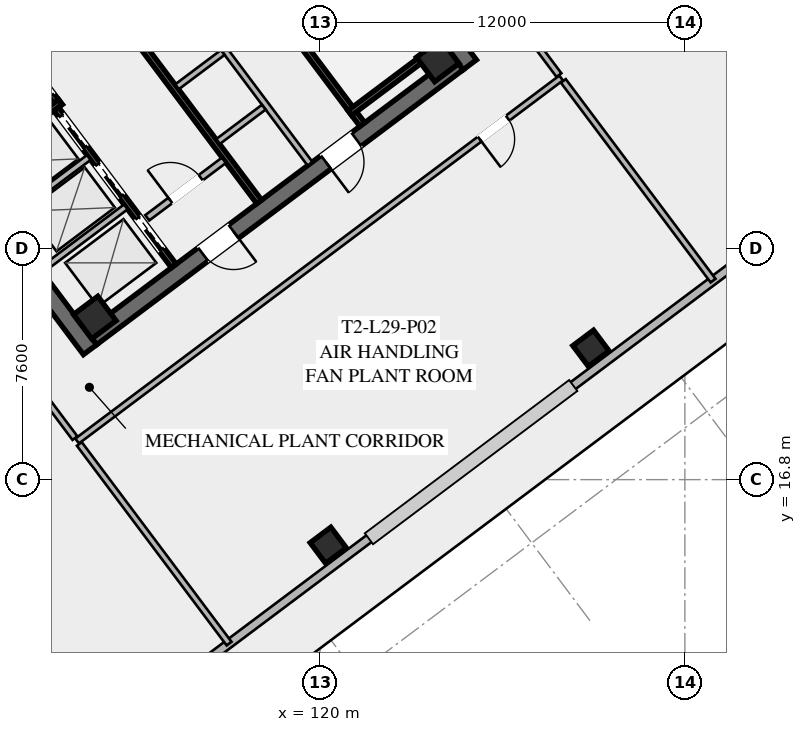
"""IFC4 building model, lengths in metres.
Left out: names, types, materials, properties, quantities, classifications, styles, units other than length and angle.
Written with IfcOpenShell. Run it as: python <this file> out.ifc"""

import sys

from ifc_helpers import new_model, si_unit, direction, frame, frame_2d, origin, origin_2d, place, context, subcontext, project, spatial, rectangle, hollow_rectangle, extrude, element, fill, save


model = new_model("IFC4")
c1 = context("Model", 3, precision=1e-05, world=origin(), true_north=direction((0.0, 1.0)))
c2 = subcontext(c1, "Body", "Model", "MODEL_VIEW")
j1 = project(units=[si_unit("LENGTHUNIT", "METRE"), si_unit("PLANEANGLEUNIT", "RADIAN")], contexts=[c1])
p1 = place(None, origin())
s1 = spatial("IfcSite", under=j1, at=p1, CompositionType="ELEMENT")
p2 = place(p1, origin())
s2 = spatial("IfcBuilding", under=s1, at=p2, CompositionType="ELEMENT")
p3 = place(p2, frame((0.0, 0.0, 109.8)))
s3 = spatial("IfcBuildingStorey", under=s2, at=p3, CompositionType="ELEMENT", Elevation=109.8)
for number, where, z_axis, x_axis in (
    (1, (112.436, 21.077, 0.0), (0.0, 0.0, 1.0), (-0.6, 0.8, 0.0)),
    (2, (115.564, 42.923, 0.0), (0.0, 0.0, 1.0), (0.6, -0.8, 0.0)),
):
    element("IfcWall", number, at=place(p3, frame(where, z_axis=z_axis, x_axis=x_axis)), inside=s3, PredefinedType="SHEAR", context=c2, shape_type="SweptSolid", body=[
        extrude(rectangle(XDim=15.6, YDim=0.55, at=frame_2d((7.8, 0.0))), origin(), (0.0, 0.0, 1.0), 4.6),
    ])
p4 = place(p3, frame((124.539, 30.498, 0.0), z_axis=(0.0, 0.0, 1.0), x_axis=(-0.799998054672, -0.600002593761, 0.0)))
e3 = element("IfcWall", 3, at=p4, inside=s3, PredefinedType="SHEAR", context=c2, shape_type="SweptSolid", body=[
    extrude(rectangle(XDim=15.06, YDim=0.55, at=frame_2d((7.53, 0.0))), origin(), (0.0, 0.0, 1.0), 4.6),
])
p5 = place(p4, frame((9.23, 0.0, 0.0)))
e4 = element("IfcOpeningElement", 4, at=p5, cuts=e3, PredefinedType="OPENING", context=c2, shape_type="SweptSolid", body=[
    extrude(rectangle(XDim=1.25, YDim=2.25, at=frame_2d((0.625, 1.125))), frame((0.0, 0.285, 0.0), z_axis=(0.0, -1.0, 0.0), x_axis=(1.0, 0.0, 0.0)), (0.0, 0.0, 1.0), 0.57),
])
p6 = place(p4, frame((4.18, 0.0, 0.0)))
e5 = element("IfcOpeningElement", 5, at=p6, cuts=e3, PredefinedType="OPENING", context=c2, shape_type="SweptSolid", body=[
    extrude(rectangle(XDim=1.25, YDim=2.25, at=frame_2d((0.625, 1.125))), frame((0.0, 0.285, 0.0), z_axis=(0.0, -1.0, 0.0), x_axis=(1.0, 0.0, 0.0)), (0.0, 0.0, 1.0), 0.57),
])
for number, where, z_axis, x_axis in (
    (6, (112.59, 22.13, 0.0), (0.0, 0.0, 1.0), (0.8, 0.6, 0.0)),
    (7, (123.87, 30.59, 0.0), (0.0, 0.0, 1.0), (0.8, 0.6, 0.0)),
):
    element("IfcColumn", number, at=place(p3, frame(where, z_axis=z_axis, x_axis=x_axis)), inside=s3, PredefinedType="COLUMN", context=c2, shape_type="SweptSolid", body=[
        extrude(hollow_rectangle(XDim=1.0, YDim=1.0, WallThickness=0.04, at=origin_2d()), origin(), (0.0, 0.0, 1.0), 4.42),
    ])
for number, where, z_axis, x_axis in (
    (8, (120.27, 14.64, -0.295), (0.0, 0.0, 1.0), (0.8, 0.6, 0.0)),
    (9, (128.91, 21.12, -0.295), (0.0, 0.0, 1.0), (0.8, 0.6, 0.0)),
):
    element("IfcColumn", number, at=place(p3, frame(where, z_axis=z_axis, x_axis=x_axis)), inside=s3, PredefinedType="COLUMN", context=c2, shape_type="SweptSolid", body=[
        extrude(hollow_rectangle(XDim=0.85, YDim=0.85, WallThickness=0.035, at=origin_2d()), origin(), (0.0, 0.0, 1.0), 4.715),
    ])
for number, where, z_axis, x_axis in (
    (10, (137.672, 26.904, 0.0), (0.0, 0.0, 1.0), (-0.8, -0.6, 0.0)),
    (11, (119.096, 55.672, 0.0), (0.0, 0.0, 1.0), (0.6, -0.8, 0.0)),
):
    element("IfcWall", number, at=place(p3, frame(where, z_axis=z_axis, x_axis=x_axis)), inside=s3, PredefinedType="SOLIDWALL", context=c2, shape_type="SweptSolid", body=[
        extrude(rectangle(XDim=31.76, YDim=0.28, at=frame_2d((15.88, 0.0))), origin(), (0.0, 0.0, 1.0), 4.42),
    ])
p7 = place(p3, frame((111.44, 29.08, 0.0), z_axis=(0.0, 0.0, 1.0), x_axis=(-0.59999029481, 0.8000072788, 0.0)))
e12 = element("IfcWall", 12, at=p7, inside=s3, PredefinedType="SHEAR", context=c2, shape_type="SweptSolid", body=[
    extrude(rectangle(XDim=8.05, YDim=0.2, at=frame_2d((4.025, 0.0))), origin(), (0.0, 0.0, 1.0), 4.42),
])
p8 = place(p7, frame((0.45, 0.0, 0.0)))
e13 = element("IfcOpeningElement", 13, at=p8, cuts=e12, PredefinedType="OPENING", context=c2, shape_type="SweptSolid", body=[
    extrude(rectangle(XDim=1.15, YDim=2.2, at=frame_2d((0.575, 1.1))), frame((0.0, 0.11, 0.0), z_axis=(0.0, -1.0, 0.0), x_axis=(1.0, 0.0, 0.0)), (0.0, 0.0, 1.0), 0.22),
])
p9 = place(p3, frame((108.396, 26.922, 0.0), z_axis=(0.0, 0.0, 1.0), x_axis=(0.800015298837, 0.599979601008, 0.0)))
e14 = element("IfcWall", 14, at=p9, inside=s3, PredefinedType="SHEAR", context=c2, shape_type="SweptSolid", body=[
    extrude(rectangle(XDim=3.83, YDim=0.2, at=frame_2d((1.915, 0.0))), origin(), (0.0, 0.0, 1.0), 4.42),
])
p10 = place(p3, frame((116.56, 34.92, 0.0), z_axis=(0.0, 0.0, 1.0), x_axis=(0.59999029481, -0.8000072788, 0.0)))
e15 = element("IfcWall", 15, at=p10, inside=s3, PredefinedType="SHEAR", context=c2, shape_type="SweptSolid", body=[
    extrude(rectangle(XDim=8.05, YDim=0.2, at=frame_2d((4.025, 0.0))), origin(), (0.0, 0.0, 1.0), 4.42),
])
p11 = place(p10, frame((0.45, 0.0, 0.0)))
e16 = element("IfcOpeningElement", 16, at=p11, cuts=e15, PredefinedType="OPENING", context=c2, shape_type="SweptSolid", body=[
    extrude(rectangle(XDim=1.15, YDim=2.2, at=frame_2d((0.575, 1.1))), frame((0.0, 0.11, 0.0), z_axis=(0.0, -1.0, 0.0), x_axis=(1.0, 0.0, 0.0)), (0.0, 0.0, 1.0), 0.22),
])
p12 = place(p3, frame((120.98, 28.86, 0.0), z_axis=(0.0, 0.0, 1.0), x_axis=(0.800015298837, 0.599979601008, 0.0)))
e17 = element("IfcWall", 17, at=p12, inside=s3, PredefinedType="SHEAR", context=c2, shape_type="SweptSolid", body=[
    extrude(rectangle(XDim=3.83, YDim=0.2, at=frame_2d((1.915, 0.0))), origin(), (0.0, 0.0, 1.0), 4.42),
])
p13 = place(p3, frame((117.998, 25.936, 0.0), z_axis=(0.0, 0.0, 1.0), x_axis=(-0.600002693989, 0.799997979501, 0.0)))
e18 = element("IfcWall", 18, at=p13, inside=s3, PredefinedType="SHEAR", context=c2, shape_type="SweptSolid", body=[
    extrude(rectangle(XDim=14.5, YDim=0.2, at=frame_2d((7.25, 0.0))), origin(), (0.0, 0.0, 1.0), 4.42),
])
p14 = place(p3, frame((114.316, 25.412, 0.0), z_axis=(0.0, 0.0, 1.0), x_axis=(0.800018601094, 0.59997519774, 0.0)))
e19 = element("IfcWall", 19, at=p14, inside=s3, PredefinedType="SOLIDWALL", context=c2, shape_type="SweptSolid", body=[
    extrude(rectangle(XDim=3.15, YDim=0.22, at=frame_2d((1.575, 0.0))), origin(), (0.0, 0.0, 1.0), 3.531),
])
p15 = place(p14, frame((0.95, 0.0, 0.0)))
e20 = element("IfcOpeningElement", 20, at=p15, cuts=e19, PredefinedType="OPENING", context=c2, shape_type="SweptSolid", body=[
    extrude(rectangle(XDim=1.25, YDim=2.25, at=frame_2d((0.625, 1.125))), frame((0.0, 0.12, 0.0), z_axis=(0.0, -1.0, 0.0), x_axis=(1.0, 0.0, 0.0)), (0.0, 0.0, 1.0), 0.24),
])
p16 = place(p3, frame((115.19, 23.83, 0.0), z_axis=(0.0, 0.0, 1.0), x_axis=(-0.599993943644, 0.800004542231, 0.0)))
e21 = element("IfcWall", 21, at=p16, inside=s3, PredefinedType="SHEAR", context=c2, shape_type="SweptSolid", body=[
    extrude(rectangle(XDim=6.45, YDim=0.2, at=frame_2d((3.225, 0.0))), origin(), (0.0, 0.0, 1.0), 4.42),
])
p17 = place(p16, frame((4.875, 0.0, 0.0)))
e22 = element("IfcOpeningElement", 22, at=p17, cuts=e21, PredefinedType="OPENING", context=c2, shape_type="SweptSolid", body=[
    extrude(rectangle(XDim=1.3, YDim=2.25, at=frame_2d((0.65, 1.125))), frame((0.0, 0.11, 0.0), z_axis=(0.0, -1.0, 0.0), x_axis=(1.0, 0.0, 0.0)), (0.0, 0.0, 1.0), 0.22),
])
p18 = place(p16, frame((2.875, 0.0, 0.0)))
e23 = element("IfcOpeningElement", 23, at=p18, cuts=e21, PredefinedType="OPENING", context=c2, shape_type="SweptSolid", body=[
    extrude(rectangle(XDim=1.3, YDim=2.25, at=frame_2d((0.65, 1.125))), frame((0.0, 0.11, 0.0), z_axis=(0.0, -1.0, 0.0), x_axis=(1.0, 0.0, 0.0)), (0.0, 0.0, 1.0), 0.22),
])
p19 = place(p16, frame((0.675, 0.0, 0.0)))
e24 = element("IfcOpeningElement", 24, at=p19, cuts=e21, PredefinedType="OPENING", context=c2, shape_type="SweptSolid", body=[
    extrude(rectangle(XDim=1.3, YDim=2.25, at=frame_2d((0.65, 1.125))), frame((0.0, 0.11, 0.0), z_axis=(0.0, -1.0, 0.0), x_axis=(1.0, 0.0, 0.0)), (0.0, 0.0, 1.0), 0.22),
])
for number, where, z_axis, x_axis in (
    (25, (110.826, 23.682, 0.0), (0.0, 0.0, 1.0), (0.8, 0.6, 0.0)),
    (26, (109.608, 25.306, 0.0), (0.0, 0.0, 1.0), (0.8, 0.6, 0.0)),
):
    element("IfcWall", number, at=place(p3, frame(where, z_axis=z_axis, x_axis=x_axis)), inside=s3, PredefinedType="SOLIDWALL", context=c2, shape_type="SweptSolid", body=[
        extrude(rectangle(XDim=3.48, YDim=0.2, at=frame_2d((1.74, 0.0))), origin(), (0.0, 0.0, 1.0), 4.42),
    ])
p20 = place(p3, frame((119.67, 27.19, 0.0), z_axis=(0.0, 0.0, 1.0), x_axis=(-0.599988677396, 0.800008491828, 0.0)))
e27 = element("IfcWall", 27, at=p20, inside=s3, PredefinedType="SOLIDWALL", context=c2, shape_type="SweptSolid", body=[
    extrude(rectangle(XDim=6.9, YDim=0.2, at=frame_2d((3.45, 0.0))), origin(), (0.0, 0.0, 1.0), 4.42),
])
p21 = place(p3, frame((116.646, 27.922, 0.0), z_axis=(0.0, 0.0, 1.0), x_axis=(0.8, 0.6, 0.0)))
e28 = element("IfcWall", 28, at=p21, inside=s3, PredefinedType="SOLIDWALL", context=c2, shape_type="SweptSolid", body=[
    extrude(rectangle(XDim=1.88, YDim=0.2, at=frame_2d((0.94, 0.0))), origin(), (0.0, 0.0, 1.0), 4.42),
])
p22 = place(p3, frame((115.296, 29.722, 0.0), z_axis=(0.0, 0.0, 1.0), x_axis=(0.799984418148, 0.600020775241, 0.0)))
e29 = element("IfcWall", 29, at=p22, inside=s3, PredefinedType="SOLIDWALL", context=c2, shape_type="SweptSolid", body=[
    extrude(rectangle(XDim=1.88, YDim=0.2, at=frame_2d((0.94, 0.0))), origin(), (0.0, 0.0, 1.0), 4.42),
])
p23 = place(p3, frame((127.93, 30.01, 0.0), z_axis=(0.0, 0.0, 1.0), x_axis=(-0.8, -0.6, 0.0)))
e30 = element("IfcWall", 30, at=p23, inside=s3, PredefinedType="SOLIDWALL", context=c2, shape_type="SweptSolid", body=[
    extrude(rectangle(XDim=19.9, YDim=0.2, at=frame_2d((9.95, 0.0))), origin(), (0.0, 0.0, 1.0), 3.531),
])
p24 = place(p23, frame((2.2, 0.0, 0.0)))
e31 = element("IfcOpeningElement", 31, at=p24, cuts=e30, PredefinedType="OPENING", context=c2, shape_type="SweptSolid", body=[
    extrude(rectangle(XDim=1.15, YDim=2.2, at=frame_2d((0.575, 1.1))), frame((0.0, 0.11, 0.0), z_axis=(0.0, -1.0, 0.0), x_axis=(1.0, 0.0, 0.0)), (0.0, 0.0, 1.0), 0.22),
])
p25 = place(p3, frame((124.0, 35.25, 0.0), z_axis=(0.0, 0.0, 1.0), x_axis=(0.599987849816, -0.800009112494, 0.0)))
e32 = element("IfcWall", 32, at=p25, inside=s3, PredefinedType="SOLIDWALL", context=c2, shape_type="SweptSolid", body=[
    extrude(rectangle(XDim=6.43, YDim=0.2, at=frame_2d((3.215, 0.0))), origin(), (0.0, 0.0, 1.0), 3.531),
])
p26 = place(p25, frame((3.0, 0.0, 0.0)))
e33 = element("IfcOpeningElement", 33, at=p26, cuts=e32, PredefinedType="OPENING", context=c2, shape_type="SweptSolid", body=[
    extrude(rectangle(XDim=1.15, YDim=2.2, at=frame_2d((0.575, 1.1))), frame((0.0, 0.11, 0.0), z_axis=(0.0, -1.0, 0.0), x_axis=(1.0, 0.0, 0.0)), (0.0, 0.0, 1.0), 0.22),
])
p27 = place(p3, frame((111.938, 18.166, 0.0), z_axis=(0.0, 0.0, 1.0), x_axis=(-0.59999602618, 0.80000298035, 0.0)))
e34 = element("IfcWall", 34, at=p27, inside=s3, PredefinedType="SOLIDWALL", context=c2, shape_type="SweptSolid", body=[
    extrude(rectangle(XDim=19.66, YDim=0.2, at=frame_2d((9.83, 0.0))), origin(), (0.0, 0.0, 1.0), 3.531),
])
p28 = place(p27, frame((3.0, 0.0, 0.0)))
e35 = element("IfcOpeningElement", 35, at=p28, cuts=e34, PredefinedType="OPENING", context=c2, shape_type="SweptSolid", body=[
    extrude(rectangle(XDim=1.25, YDim=2.25, at=frame_2d((0.625, 1.125))), frame((0.0, 0.11, 0.0), z_axis=(0.0, -1.0, 0.0), x_axis=(1.0, 0.0, 0.0)), (0.0, 0.0, 1.0), 0.22),
])
p29 = place(p27, frame((13.2, 0.0, 0.0)))
e36 = element("IfcOpeningElement", 36, at=p29, cuts=e34, PredefinedType="OPENING", context=c2, shape_type="SweptSolid", body=[
    extrude(rectangle(XDim=1.15, YDim=2.2, at=frame_2d((0.575, 1.1))), frame((0.0, 0.11, 0.0), z_axis=(0.0, -1.0, 0.0), x_axis=(1.0, 0.0, 0.0)), (0.0, 0.0, 1.0), 0.22),
])
for number, where, z_axis, x_axis in (
    (37, (112.082, 17.974, 0.0), (0.0, 0.0, 1.0), (0.6, -0.8, 0.0)),
    (38, (128.002, 29.914, 0.0), (0.0, 0.0, 1.0), (0.6, -0.8, 0.0)),
):
    element("IfcWall", number, at=place(p3, frame(where, z_axis=z_axis, x_axis=x_axis)), inside=s3, PredefinedType="SOLIDWALL", context=c2, shape_type="SweptSolid", body=[
        extrude(rectangle(XDim=8.21, YDim=0.2, at=frame_2d((4.105, 0.0))), origin(), (0.0, 0.0, 1.0), 3.531),
    ])
p30 = place(p5, origin())
e39 = element("IfcDoor", 39, at=p30, inside=s3, OperationType="SINGLE_SWING_LEFT", PredefinedType="DOOR", context=c2, shape_type="SweptSolid", body=[
    extrude(rectangle(XDim=1.25, YDim=2.25, at=frame_2d((0.625, 1.125))), frame((0.0, 0.025, 0.0), z_axis=(0.0, -1.0, 0.0), x_axis=(1.0, 0.0, 0.0)), (0.0, 0.0, 1.0), 0.05),
])
fill(e4, e39)
p31 = place(p6, origin())
e40 = element("IfcDoor", 40, at=p31, inside=s3, OperationType="SINGLE_SWING_RIGHT", PredefinedType="DOOR", context=c2, shape_type="SweptSolid", body=[
    extrude(rectangle(XDim=1.25, YDim=2.25, at=frame_2d((0.625, 1.125))), frame((0.0, 0.025, 0.0), z_axis=(0.0, -1.0, 0.0), x_axis=(1.0, 0.0, 0.0)), (0.0, 0.0, 1.0), 0.05),
])
fill(e5, e40)
p32 = place(p8, origin())
e41 = element("IfcDoor", 41, at=p32, inside=s3, OperationType="SINGLE_SWING_RIGHT", PredefinedType="DOOR", context=c2, shape_type="SweptSolid", body=[
    extrude(rectangle(XDim=1.15, YDim=2.2, at=frame_2d((0.575, 1.1))), frame((0.0, 0.025, 0.0), z_axis=(0.0, -1.0, 0.0), x_axis=(1.0, 0.0, 0.0)), (0.0, 0.0, 1.0), 0.05),
])
fill(e13, e41)
p33 = place(p15, origin())
e42 = element("IfcDoor", 42, at=p33, inside=s3, OperationType="SINGLE_SWING_LEFT", PredefinedType="DOOR", context=c2, shape_type="SweptSolid", body=[
    extrude(rectangle(XDim=1.25, YDim=2.25, at=frame_2d((0.625, 1.125))), frame((0.0, 0.025, 0.0), z_axis=(0.0, -1.0, 0.0), x_axis=(1.0, 0.0, 0.0)), (0.0, 0.0, 1.0), 0.05),
])
fill(e20, e42)
p34 = place(p24, origin())
e43 = element("IfcDoor", 43, at=p34, inside=s3, OperationType="SINGLE_SWING_RIGHT", PredefinedType="DOOR", context=c2, shape_type="SweptSolid", body=[
    extrude(rectangle(XDim=1.15, YDim=2.2, at=frame_2d((0.575, 1.1))), frame((0.0, 0.025, 0.0), z_axis=(0.0, -1.0, 0.0), x_axis=(1.0, 0.0, 0.0)), (0.0, 0.0, 1.0), 0.05),
])
fill(e31, e43)
p35 = place(p17, origin())
e44 = element("IfcDoor", 44, at=p35, inside=s3, OperationType="SLIDING_TO_LEFT", PredefinedType="DOOR", context=c2, shape_type="SweptSolid", body=[
    extrude(rectangle(XDim=1.3, YDim=2.25, at=frame_2d((0.65, 1.125))), frame((0.0, 0.025, 0.0), z_axis=(0.0, -1.0, 0.0), x_axis=(1.0, 0.0, 0.0)), (0.0, 0.0, 1.0), 0.05),
])
fill(e22, e44)
p36 = place(p18, origin())
e45 = element("IfcDoor", 45, at=p36, inside=s3, OperationType="SLIDING_TO_LEFT", PredefinedType="DOOR", context=c2, shape_type="SweptSolid", body=[
    extrude(rectangle(XDim=1.3, YDim=2.25, at=frame_2d((0.65, 1.125))), frame((0.0, 0.025, 0.0), z_axis=(0.0, -1.0, 0.0), x_axis=(1.0, 0.0, 0.0)), (0.0, 0.0, 1.0), 0.05),
])
fill(e23, e45)
p37 = place(p19, origin())
e46 = element("IfcDoor", 46, at=p37, inside=s3, OperationType="SLIDING_TO_LEFT", PredefinedType="DOOR", context=c2, shape_type="SweptSolid", body=[
    extrude(rectangle(XDim=1.3, YDim=2.25, at=frame_2d((0.65, 1.125))), frame((0.0, 0.025, 0.0), z_axis=(0.0, -1.0, 0.0), x_axis=(1.0, 0.0, 0.0)), (0.0, 0.0, 1.0), 0.05),
])
fill(e24, e46)
save(model, sys.argv[1])
